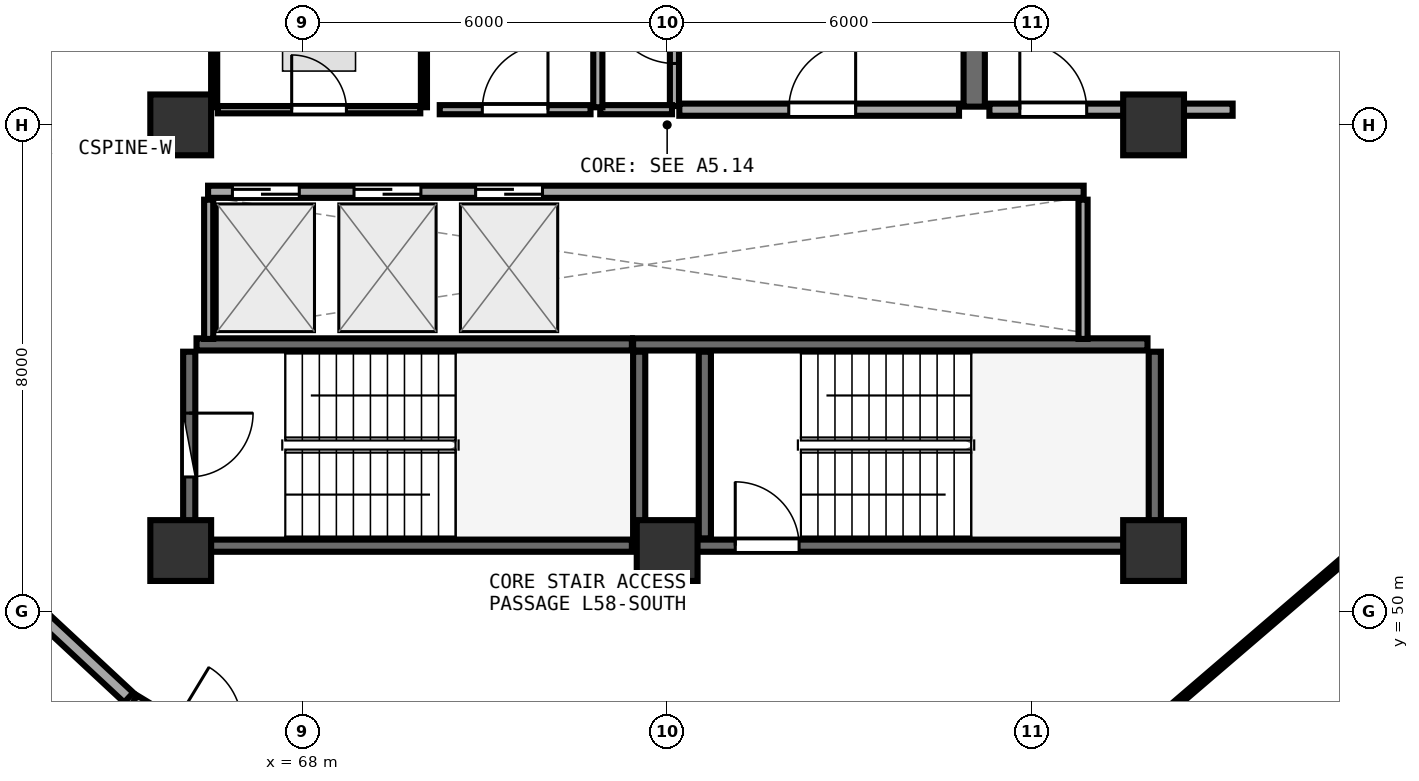
"""IFC4 building model, lengths in metres.
Left out: names, types, materials, properties, quantities, classifications, styles, units other than length and angle.
Written with IfcOpenShell. Run it as: python <this file> out.ifc"""

import sys

from ifc_helpers import new_model, si_unit, direction, frame, frame_2d, origin, origin_2d, place, context, subcontext, project, spatial, rectangle, extrude, element, fill, save


model = new_model("IFC4")
c1 = context("Model", 3, precision=1e-05, world=origin(), true_north=direction((0.0, 1.0)))
c2 = subcontext(c1, "Body", "Model", "MODEL_VIEW")
j1 = project(units=[si_unit("LENGTHUNIT", "METRE"), si_unit("PLANEANGLEUNIT", "RADIAN")], contexts=[c1])
p1 = place(None, origin())
s1 = spatial("IfcSite", under=j1, at=p1, CompositionType="ELEMENT")
p2 = place(p1, origin())
s2 = spatial("IfcBuilding", under=s1, at=p2, CompositionType="ELEMENT")
p3 = place(p2, frame((0.0, 0.0, 226.95)))
s3 = spatial("IfcBuildingStorey", under=s2, at=p3, CompositionType="ELEMENT", Elevation=226.95)
for number, where, z_axis, x_axis in (
    (1, (66.0, 51.0, 0.0), (0.0, 0.0, 1.0), (1.0, 0.0, 0.0)),
    (2, (74.0, 51.0, 0.0), (0.0, 0.0, 1.0), (1.0, 0.0, 0.0)),
    (3, (82.0, 51.0, 0.0), (0.0, 0.0, 1.0), (1.0, 0.0, 0.0)),
    (4, (82.0, 58.0, 0.0), (0.0, 0.0, 1.0), (1.0, 0.0, 0.0)),
    (5, (66.0, 58.0, 0.0), (0.0, 0.0, 1.0), (1.0, 0.0, 0.0)),
):
    element("IfcColumn", number, at=place(p3, frame(where, z_axis=z_axis, x_axis=x_axis)), inside=s3, PredefinedType="PILASTER", context=c2, shape_type="SweptSolid", body=[
        extrude(rectangle(XDim=1.0, YDim=1.0, at=origin_2d()), origin(), (0.0, 0.0, 1.0), 3.75),
    ])
p4 = place(p3, frame((74.0, 51.08, 0.0), z_axis=(0.0, 0.0, 1.0), x_axis=(1.0, 0.0, 0.0)))
e6 = element("IfcWall", 6, at=p4, inside=s3, PredefinedType="SHEAR", context=c2, shape_type="SweptSolid", body=[
    extrude(rectangle(XDim=7.9, YDim=0.2, at=frame_2d((3.95, 0.0))), origin(), (0.0, 0.0, 1.0), 3.49),
])
p5 = place(p4, frame((1.12, 0.0, 0.0)))
e7 = element("IfcOpeningElement", 7, at=p5, cuts=e6, PredefinedType="OPENING", context=c2, shape_type="SweptSolid", body=[
    extrude(rectangle(XDim=1.05, YDim=2.1, at=frame_2d((0.525, 1.05))), frame((0.0, 0.11, 0.0), z_axis=(0.0, -1.0, 0.0), x_axis=(1.0, 0.0, 0.0)), (0.0, 0.0, 1.0), 0.22),
])
p6 = place(p3, frame((82.02, 51.2, 0.0), z_axis=(0.0, 0.0, 1.0), x_axis=(0.0, 1.0, 0.0)))
e8 = element("IfcWall", 8, at=p6, inside=s3, PredefinedType="SHEAR", context=c2, shape_type="SweptSolid", body=[
    extrude(rectangle(XDim=3.07, YDim=0.2, at=frame_2d((1.535, 0.0))), origin(), (0.0, 0.0, 1.0), 3.49),
])
p7 = place(p3, frame((81.9, 54.39, 0.0), z_axis=(0.0, 0.0, 1.0), x_axis=(-1.0, 0.0, 0.0)))
e9 = element("IfcWall", 9, at=p7, inside=s3, PredefinedType="SHEAR", context=c2, shape_type="SweptSolid", body=[
    extrude(rectangle(XDim=8.46, YDim=0.2, at=frame_2d((4.23, 0.0))), origin(), (0.0, 0.0, 1.0), 3.49),
])
p8 = place(p3, frame((74.62, 54.27, 0.0), z_axis=(0.0, 0.0, 1.0), x_axis=(0.0, -1.0, 0.0)))
e10 = element("IfcWall", 10, at=p8, inside=s3, PredefinedType="SHEAR", context=c2, shape_type="SweptSolid", body=[
    extrude(rectangle(XDim=3.07, YDim=0.2, at=frame_2d((1.535, 0.0))), origin(), (0.0, 0.0, 1.0), 3.49),
])
p9 = place(p3, frame((66.26, 51.08, 0.0), z_axis=(0.0, 0.0, 1.0), x_axis=(1.0, 0.0, 0.0)))
e11 = element("IfcWall", 11, at=p9, inside=s3, PredefinedType="SHEAR", context=c2, shape_type="SweptSolid", body=[
    extrude(rectangle(XDim=7.16, YDim=0.2, at=frame_2d((3.58, 0.0))), origin(), (0.0, 0.0, 1.0), 3.49),
])
p10 = place(p3, frame((73.54, 51.2, 0.0), z_axis=(0.0, 0.0, 1.0), x_axis=(0.0, 1.0, 0.0)))
e12 = element("IfcWall", 12, at=p10, inside=s3, PredefinedType="SHEAR", context=c2, shape_type="SweptSolid", body=[
    extrude(rectangle(XDim=3.07, YDim=0.2, at=frame_2d((1.535, 0.0))), origin(), (0.0, 0.0, 1.0), 3.49),
])
p11 = place(p3, frame((73.42, 54.39, 0.0), z_axis=(0.0, 0.0, 1.0), x_axis=(-1.0, 0.0, 0.0)))
e13 = element("IfcWall", 13, at=p11, inside=s3, PredefinedType="SHEAR", context=c2, shape_type="SweptSolid", body=[
    extrude(rectangle(XDim=7.16, YDim=0.2, at=frame_2d((3.58, 0.0))), origin(), (0.0, 0.0, 1.0), 3.49),
])
p12 = place(p3, frame((66.14, 54.27, 0.0), z_axis=(0.0, 0.0, 1.0), x_axis=(0.0, -1.0, 0.0)))
e14 = element("IfcWall", 14, at=p12, inside=s3, PredefinedType="SHEAR", context=c2, shape_type="SweptSolid", body=[
    extrude(rectangle(XDim=3.07, YDim=0.2, at=frame_2d((1.535, 0.0))), origin(), (0.0, 0.0, 1.0), 3.49),
])
p13 = place(p12, frame((1.01, 0.0, 0.0)))
e15 = element("IfcOpeningElement", 15, at=p13, cuts=e14, PredefinedType="OPENING", context=c2, shape_type="SweptSolid", body=[
    extrude(rectangle(XDim=1.05, YDim=2.1, at=frame_2d((0.525, 1.05))), frame((0.0, 0.11, 0.0), z_axis=(0.0, -1.0, 0.0), x_axis=(1.0, 0.0, 0.0)), (0.0, 0.0, 1.0), 0.22),
])
p14 = place(p3, frame((79.05, 58.3, 0.0), z_axis=(0.0, 0.0, 1.0), x_axis=(0.0, 1.0, 0.0)))
e16 = element("IfcWall", 16, at=p14, inside=s3, PredefinedType="SHEAR", context=c2, shape_type="SweptSolid", body=[
    extrude(rectangle(XDim=6.3, YDim=0.35, at=frame_2d((3.15, 0.0))), origin(), (0.0, 0.0, 1.0), 3.49),
])
p15 = place(p3, frame((74.2, 58.25, 0.0), z_axis=(0.0, 0.0, 1.0), x_axis=(1.0, 0.0, 0.0)))
e17 = element("IfcWall", 17, at=p15, inside=s3, PredefinedType="SOLIDWALL", context=c2, shape_type="SweptSolid", body=[
    extrude(rectangle(XDim=4.6, YDim=0.2, at=frame_2d((2.3, 0.0))), origin(), (0.0, 0.0, 1.0), 3.48),
])
p16 = place(p15, frame((1.8, 0.0, 0.0)))
e18 = element("IfcOpeningElement", 18, at=p16, cuts=e17, PredefinedType="OPENING", context=c2, shape_type="SweptSolid", body=[
    extrude(rectangle(XDim=1.1, YDim=2.1, at=frame_2d((0.55, 1.05))), frame((0.0, 0.11, 0.0), z_axis=(0.0, -1.0, 0.0), x_axis=(1.0, 0.0, 0.0)), (0.0, 0.0, 1.0), 0.22),
])
p17 = place(p3, frame((79.3, 58.25, 0.0), z_axis=(0.0, 0.0, 1.0), x_axis=(1.0, 0.0, 0.0)))
e19 = element("IfcWall", 19, at=p17, inside=s3, PredefinedType="SOLIDWALL", context=c2, shape_type="SweptSolid", body=[
    extrude(rectangle(XDim=4.0, YDim=0.2, at=frame_2d((2.0, 0.0))), origin(), (0.0, 0.0, 1.0), 2.775),
])
p18 = place(p17, frame((0.5, 0.0, 0.0)))
e20 = element("IfcOpeningElement", 20, at=p18, cuts=e19, PredefinedType="OPENING", context=c2, shape_type="SweptSolid", body=[
    extrude(rectangle(XDim=1.1, YDim=2.1, at=frame_2d((0.55, 1.05))), frame((0.0, 0.11, 0.0), z_axis=(0.0, -1.0, 0.0), x_axis=(1.0, 0.0, 0.0)), (0.0, 0.0, 1.0), 0.22),
])
p19 = place(p3, frame((66.45, 56.9, 0.0), z_axis=(0.0, 0.0, 1.0), x_axis=(1.0, 0.0, 0.0)))
e21 = element("IfcWall", 21, at=p19, inside=s3, PredefinedType="SOLIDWALL", context=c2, shape_type="SweptSolid", body=[
    extrude(rectangle(XDim=14.4, YDim=0.2, at=frame_2d((7.2, 0.0))), origin(), (0.0, 0.0, 1.0), 3.48),
])
p20 = place(p19, frame((0.4, 0.0, 0.0)))
e22 = element("IfcOpeningElement", 22, at=p20, cuts=e21, PredefinedType="OPENING", context=c2, shape_type="SweptSolid", body=[
    extrude(rectangle(XDim=1.1, YDim=2.1, at=frame_2d((0.55, 1.05))), frame((0.0, 0.11, 0.0), z_axis=(0.0, -1.0, 0.0), x_axis=(1.0, 0.0, 0.0)), (0.0, 0.0, 1.0), 0.22),
])
p21 = place(p19, frame((2.4, 0.0, 0.0)))
e23 = element("IfcOpeningElement", 23, at=p21, cuts=e21, PredefinedType="OPENING", context=c2, shape_type="SweptSolid", body=[
    extrude(rectangle(XDim=1.1, YDim=2.1, at=frame_2d((0.55, 1.05))), frame((0.0, 0.11, 0.0), z_axis=(0.0, -1.0, 0.0), x_axis=(1.0, 0.0, 0.0)), (0.0, 0.0, 1.0), 0.22),
])
p22 = place(p19, frame((4.4, 0.0, 0.0)))
e24 = element("IfcOpeningElement", 24, at=p22, cuts=e21, PredefinedType="OPENING", context=c2, shape_type="SweptSolid", body=[
    extrude(rectangle(XDim=1.1, YDim=2.1, at=frame_2d((0.55, 1.05))), frame((0.0, 0.11, 0.0), z_axis=(0.0, -1.0, 0.0), x_axis=(1.0, 0.0, 0.0)), (0.0, 0.0, 1.0), 0.22),
])
for number, where, z_axis, x_axis in (
    (25, (66.46, 54.48, 0.0), (0.0, 0.0, 1.0), (0.0, 1.0, 0.0)),
    (26, (80.84, 54.48, 0.0), (0.0, 0.0, 1.0), (0.0, 1.0, 0.0)),
):
    element("IfcWall", number, at=place(p3, frame(where, z_axis=z_axis, x_axis=x_axis)), inside=s3, PredefinedType="PARTITIONING", context=c2, shape_type="SweptSolid", body=[
        extrude(rectangle(XDim=2.29, YDim=0.15, at=frame_2d((1.145, 0.0))), origin(), (0.0, 0.0, 1.0), 3.48),
    ])
p23 = place(p3, frame((74.12, 58.31, 0.0), z_axis=(0.0, 0.0, 1.0), x_axis=(0.0, 1.0, 0.0)))
e27 = element("IfcWall", 27, at=p23, inside=s3, PredefinedType="PARTITIONING", context=c2, shape_type="SweptSolid", body=[
    extrude(rectangle(XDim=2.48, YDim=0.15, at=frame_2d((1.24, 0.0))), origin(), (0.0, 0.0, 1.0), 3.48),
])
p24 = place(p23, frame((0.7, 0.0, 0.0)))
e28 = element("IfcOpeningElement", 28, at=p24, cuts=e27, PredefinedType="OPENING", context=c2, shape_type="SweptSolid", body=[
    extrude(rectangle(XDim=1.08, YDim=2.1, at=frame_2d((0.54, 1.05))), frame((0.0, 0.085, 0.0), z_axis=(0.0, -1.0, 0.0), x_axis=(1.0, 0.0, 0.0)), (0.0, 0.0, 1.0), 0.17),
])
p25 = place(p3, frame((66.61, 58.25, 0.0), z_axis=(0.0, 0.0, 1.0), x_axis=(1.0, 0.0, 0.0)))
e29 = element("IfcWall", 29, at=p25, inside=s3, PredefinedType="PARTITIONING", context=c2, shape_type="SweptSolid", body=[
    extrude(rectangle(XDim=3.33, YDim=0.12, at=frame_2d((1.665, 0.0))), origin(), (0.0, 0.0, 1.0), 3.48),
])
p26 = place(p25, frame((1.215, 0.0, 0.0)))
e30 = element("IfcOpeningElement", 30, at=p26, cuts=e29, PredefinedType="OPENING", context=c2, shape_type="SweptSolid", body=[
    extrude(rectangle(XDim=0.9, YDim=2.08, at=frame_2d((0.45, 1.04))), frame((0.0, 0.07, 0.0), z_axis=(0.0, -1.0, 0.0), x_axis=(1.0, 0.0, 0.0)), (0.0, 0.0, 1.0), 0.14),
])
p27 = place(p3, frame((70.26, 58.25, 0.0), z_axis=(0.0, 0.0, 1.0), x_axis=(1.0, 0.0, 0.0)))
e31 = element("IfcWall", 31, at=p27, inside=s3, PredefinedType="PARTITIONING", context=c2, shape_type="SweptSolid", body=[
    extrude(rectangle(XDim=2.48, YDim=0.15, at=frame_2d((1.24, 0.0))), origin(), (0.0, 0.0, 1.0), 3.48),
])
p28 = place(p27, frame((0.7, 0.0, 0.0)))
e32 = element("IfcOpeningElement", 32, at=p28, cuts=e31, PredefinedType="OPENING", context=c2, shape_type="SweptSolid", body=[
    extrude(rectangle(XDim=1.08, YDim=2.1, at=frame_2d((0.54, 1.05))), frame((0.0, 0.085, 0.0), z_axis=(0.0, -1.0, 0.0), x_axis=(1.0, 0.0, 0.0)), (0.0, 0.0, 1.0), 0.17),
])
p29 = place(p3, frame((65.226, 48.524, 0.0), z_axis=(0.0, 0.0, 1.0), x_axis=(0.855153479855, -0.518374889333, 0.0)))
e33 = element("IfcWall", 33, at=p29, inside=s3, PredefinedType="SOLIDWALL", context=c2, shape_type="SweptSolid", body=[
    extrude(rectangle(XDim=2.662, YDim=0.22, at=frame_2d((1.331, 0.0))), origin(), (0.0, 0.0, 1.0), 3.025),
])
p30 = place(p29, frame((0.771, 0.0, 0.0)))
e34 = element("IfcOpeningElement", 34, at=p30, cuts=e33, PredefinedType="OPENING", context=c2, shape_type="SweptSolid", body=[
    extrude(rectangle(XDim=1.12, YDim=2.1, at=frame_2d((0.56, 1.05))), frame((0.0, 0.12, 0.0), z_axis=(0.0, -1.0, 0.0), x_axis=(1.0, 0.0, 0.0)), (0.0, 0.0, 1.0), 0.24),
])
p31 = place(p3, frame((72.9, 58.25, 0.0), z_axis=(0.0, 0.0, 1.0), x_axis=(1.0, 0.0, 0.0)))
e35 = element("IfcWall", 35, at=p31, inside=s3, PredefinedType="PARTITIONING", context=c2, shape_type="SweptSolid", body=[
    extrude(rectangle(XDim=1.18, YDim=0.15, at=frame_2d((0.59, 0.0))), origin(), (0.0, 0.0, 1.0), 3.48),
])
p32 = place(p3, frame((72.86, 60.81, 0.0), z_axis=(0.0, 0.0, 1.0), x_axis=(0.0, -1.0, 0.0)))
e36 = element("IfcWall", 36, at=p32, inside=s3, PredefinedType="PARTITIONING", context=c2, shape_type="SweptSolid", body=[
    extrude(rectangle(XDim=2.52, YDim=0.15, at=frame_2d((1.26, 0.0))), origin(), (0.0, 0.0, 1.0), 3.48),
])
for number, where, z_axis, x_axis in (
    (37, (70.0, 58.29, 0.0), (0.0, 0.0, 1.0), (0.0, 1.0, 0.0)),
    (38, (66.55, 60.68, 0.0), (0.0, 0.0, 1.0), (0.0, -1.0, 0.0)),
):
    element("IfcWall", number, at=place(p3, frame(where, z_axis=z_axis, x_axis=x_axis)), inside=s3, PredefinedType="PARTITIONING", context=c2, shape_type="SweptSolid", body=[
        extrude(rectangle(XDim=2.39, YDim=0.1, at=frame_2d((1.195, 0.0))), origin(), (0.0, 0.0, 1.0), 3.48),
    ])
p33 = place(p3, frame((63.21, 50.382, 0.0), z_axis=(0.0, 0.0, 1.0), x_axis=(0.732365628242, -0.680911584987, 0.0)))
e39 = element("IfcWall", 39, at=p33, inside=s3, PredefinedType="SOLIDWALL", context=c2, shape_type="SweptSolid", body=[
    extrude(rectangle(XDim=2.643, YDim=0.22, at=frame_2d((1.321, 0.0))), origin(), (0.0, 0.0, 1.0), 3.025),
])
p34 = place(p3, frame((81.316, 47.575, 0.0), z_axis=(0.0, 0.0, 1.0), x_axis=(0.758934846266, 0.651166567879, 0.0)))
e40 = element("IfcWall", 40, at=p34, inside=s3, PredefinedType="PARTITIONING", context=c2, shape_type="SweptSolid", body=[
    extrude(rectangle(XDim=5.197, YDim=0.1, at=frame_2d((2.598, 0.0))), origin(), (0.0, 0.0, 1.0), 3.025),
])
p35 = place(p5, origin())
e41 = element("IfcDoor", 41, at=p35, inside=s3, OperationType="SINGLE_SWING_LEFT", PredefinedType="DOOR", context=c2, shape_type="SweptSolid", body=[
    extrude(rectangle(XDim=1.05, YDim=2.1, at=frame_2d((0.525, 1.05))), frame((0.0, 0.025, 0.0), z_axis=(0.0, -1.0, 0.0), x_axis=(1.0, 0.0, 0.0)), (0.0, 0.0, 1.0), 0.05),
])
fill(e7, e41)
p36 = place(p13, origin())
e42 = element("IfcDoor", 42, at=p36, inside=s3, OperationType="SINGLE_SWING_LEFT", PredefinedType="DOOR", context=c2, shape_type="SweptSolid", body=[
    extrude(rectangle(XDim=1.05, YDim=2.1, at=frame_2d((0.525, 1.05))), frame((0.0, 0.025, 0.0), z_axis=(0.0, -1.0, 0.0), x_axis=(1.0, 0.0, 0.0)), (0.0, 0.0, 1.0), 0.05),
])
fill(e15, e42)
p37 = place(p16, frame((1.1, 0.0, 0.0), z_axis=(0.0, 0.0, 1.0), x_axis=(-1.0, 0.0, 0.0)))
e43 = element("IfcDoor", 43, at=p37, inside=s3, OperationType="SINGLE_SWING_LEFT", PredefinedType="DOOR", context=c2, shape_type="SweptSolid", body=[
    extrude(rectangle(XDim=1.1, YDim=2.1, at=frame_2d((0.55, 1.05))), frame((0.0, 0.025, 0.0), z_axis=(0.0, -1.0, 0.0), x_axis=(1.0, 0.0, 0.0)), (0.0, 0.0, 1.0), 0.05),
])
fill(e18, e43)
p38 = place(p18, frame((1.1, 0.0, 0.0), z_axis=(0.0, 0.0, 1.0), x_axis=(-1.0, 0.0, 0.0)))
e44 = element("IfcDoor", 44, at=p38, inside=s3, OperationType="SINGLE_SWING_RIGHT", PredefinedType="DOOR", context=c2, shape_type="SweptSolid", body=[
    extrude(rectangle(XDim=1.1, YDim=2.1, at=frame_2d((0.55, 1.05))), frame((0.0, 0.025, 0.0), z_axis=(0.0, -1.0, 0.0), x_axis=(1.0, 0.0, 0.0)), (0.0, 0.0, 1.0), 0.05),
])
fill(e20, e44)
p39 = place(p20, origin())
e45 = element("IfcDoor", 45, at=p39, inside=s3, OperationType="DOUBLE_DOOR_SLIDING", PredefinedType="DOOR", context=c2, shape_type="SweptSolid", body=[
    extrude(rectangle(XDim=1.1, YDim=2.1, at=frame_2d((0.55, 1.05))), frame((0.0, 0.025, 0.0), z_axis=(0.0, -1.0, 0.0), x_axis=(1.0, 0.0, 0.0)), (0.0, 0.0, 1.0), 0.05),
])
fill(e22, e45)
p40 = place(p21, origin())
e46 = element("IfcDoor", 46, at=p40, inside=s3, OperationType="DOUBLE_DOOR_SLIDING", PredefinedType="DOOR", context=c2, shape_type="SweptSolid", body=[
    extrude(rectangle(XDim=1.1, YDim=2.1, at=frame_2d((0.55, 1.05))), frame((0.0, 0.025, 0.0), z_axis=(0.0, -1.0, 0.0), x_axis=(1.0, 0.0, 0.0)), (0.0, 0.0, 1.0), 0.05),
])
fill(e23, e46)
p41 = place(p22, origin())
e47 = element("IfcDoor", 47, at=p41, inside=s3, OperationType="DOUBLE_DOOR_SLIDING", PredefinedType="DOOR", context=c2, shape_type="SweptSolid", body=[
    extrude(rectangle(XDim=1.1, YDim=2.1, at=frame_2d((0.55, 1.05))), frame((0.0, 0.025, 0.0), z_axis=(0.0, -1.0, 0.0), x_axis=(1.0, 0.0, 0.0)), (0.0, 0.0, 1.0), 0.05),
])
fill(e24, e47)
p42 = place(p24, origin())
e48 = element("IfcDoor", 48, at=p42, inside=s3, OperationType="SINGLE_SWING_RIGHT", PredefinedType="DOOR", context=c2, shape_type="SweptSolid", body=[
    extrude(rectangle(XDim=1.08, YDim=2.1, at=frame_2d((0.54, 1.05))), frame((0.0, 0.025, 0.0), z_axis=(0.0, -1.0, 0.0), x_axis=(1.0, 0.0, 0.0)), (0.0, 0.0, 1.0), 0.05),
])
fill(e28, e48)
p43 = place(p26, origin())
e49 = element("IfcDoor", 49, at=p43, inside=s3, OperationType="SINGLE_SWING_LEFT", PredefinedType="DOOR", context=c2, shape_type="SweptSolid", body=[
    extrude(rectangle(XDim=0.9, YDim=2.08, at=frame_2d((0.45, 1.04))), frame((0.0, 0.025, 0.0), z_axis=(0.0, -1.0, 0.0), x_axis=(1.0, 0.0, 0.0)), (0.0, 0.0, 1.0), 0.05),
])
fill(e30, e49)
p44 = place(p28, origin())
e50 = element("IfcDoor", 50, at=p44, inside=s3, OperationType="SINGLE_SWING_RIGHT", PredefinedType="DOOR", context=c2, shape_type="SweptSolid", body=[
    extrude(rectangle(XDim=1.08, YDim=2.1, at=frame_2d((0.54, 1.05))), frame((0.0, 0.025, 0.0), z_axis=(0.0, -1.0, 0.0), x_axis=(1.0, 0.0, 0.0)), (0.0, 0.0, 1.0), 0.05),
])
fill(e32, e50)
save(model, sys.argv[1])
